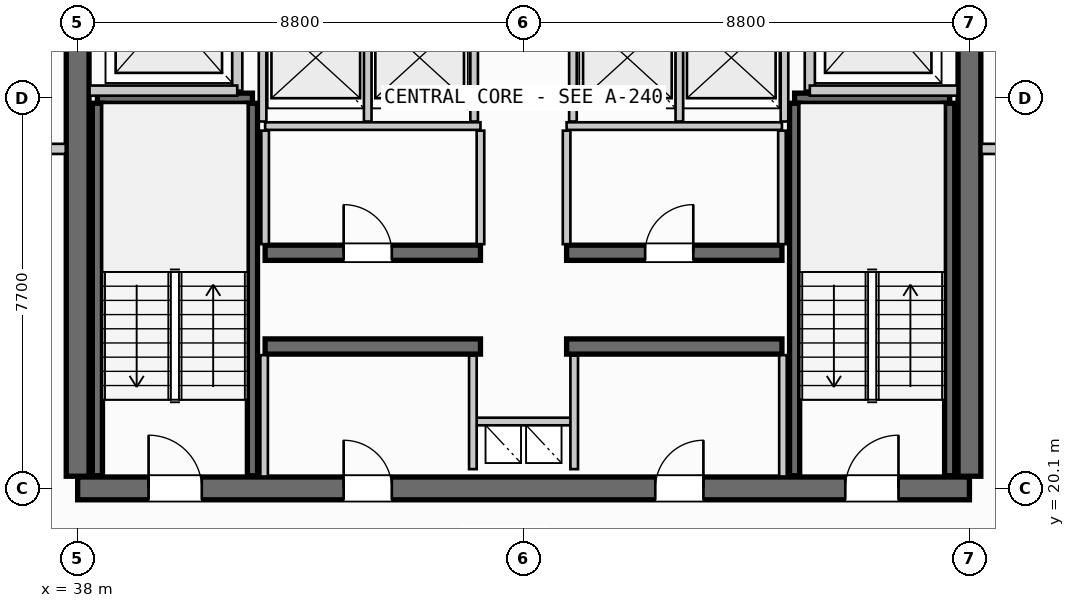
"""IFC4 building model, lengths in metres.
Left out: names, types, materials, properties, quantities, classifications, styles, units other than length and angle.
Written with IfcOpenShell. Run it as: python <this file> out.ifc"""

import sys

from ifc_helpers import new_model, si_unit, direction, frame, frame_2d, origin, place, context, subcontext, project, spatial, rectangle, extrude, source, transform, mapped, element, fill, save


model = new_model("IFC4")
c1 = context("Model", 3, precision=1e-05, world=origin(), true_north=direction((0.0, 1.0)))
c2 = subcontext(c1, "Body", "Model", "MODEL_VIEW")
j1 = project(units=[si_unit("LENGTHUNIT", "METRE"), si_unit("PLANEANGLEUNIT", "RADIAN")], contexts=[c1])
p1 = place(None, origin())
s1 = spatial("IfcSite", under=j1, at=p1, CompositionType="ELEMENT")
p2 = place(p1, origin())
s2 = spatial("IfcBuilding", under=s1, at=p2, CompositionType="ELEMENT")
p3 = place(p2, frame((0.0, 0.0, 287.05)))
s3 = spatial("IfcBuildingStorey", under=s2, at=p3, CompositionType="ELEMENT", Elevation=287.05)
p4 = place(p3, frame((38.0, 20.1, 0.0), z_axis=(0.0, 0.0, 1.0), x_axis=(1.0, 0.0, 0.0)))
e1 = element("IfcWall", 1, at=p4, inside=s3, PredefinedType="SHEAR", context=c2, shape_type="SweptSolid", body=[
    extrude(rectangle(XDim=17.6, YDim=0.45, at=frame_2d((8.8, 0.0))), origin(), (0.0, 0.0, 1.0), 3.21),
])
p5 = place(p4, frame((1.4, 0.0, 0.0)))
e2 = element("IfcOpeningElement", 2, at=p5, cuts=e1, PredefinedType="OPENING", context=c2, shape_type="SweptSolid", body=[
    extrude(rectangle(XDim=1.05, YDim=2.15, at=frame_2d((0.525, 1.075))), frame((0.0, 0.235, 0.0), z_axis=(0.0, -1.0, 0.0), x_axis=(1.0, 0.0, 0.0)), (0.0, 0.0, 1.0), 0.47),
])
p6 = place(p4, frame((15.15, 0.0, 0.0)))
e3 = element("IfcOpeningElement", 3, at=p6, cuts=e1, PredefinedType="OPENING", context=c2, shape_type="SweptSolid", body=[
    extrude(rectangle(XDim=1.05, YDim=2.15, at=frame_2d((0.525, 1.075))), frame((0.0, 0.235, 0.0), z_axis=(0.0, -1.0, 0.0), x_axis=(1.0, 0.0, 0.0)), (0.0, 0.0, 1.0), 0.47),
])
p7 = place(p4, frame((5.25, 0.0, 0.0)))
e4 = element("IfcOpeningElement", 4, at=p7, cuts=e1, PredefinedType="OPENING", context=c2, shape_type="SweptSolid", body=[
    extrude(rectangle(XDim=0.95, YDim=2.15, at=frame_2d((0.475, 1.075))), frame((0.0, 0.235, 0.0), z_axis=(0.0, -1.0, 0.0), x_axis=(1.0, 0.0, 0.0)), (0.0, 0.0, 1.0), 0.47),
])
p8 = place(p4, frame((11.4, 0.0, 0.0)))
e5 = element("IfcOpeningElement", 5, at=p8, cuts=e1, PredefinedType="OPENING", context=c2, shape_type="SweptSolid", body=[
    extrude(rectangle(XDim=0.95, YDim=2.15, at=frame_2d((0.475, 1.075))), frame((0.0, 0.235, 0.0), z_axis=(0.0, -1.0, 0.0), x_axis=(1.0, 0.0, 0.0)), (0.0, 0.0, 1.0), 0.47),
])
p9 = place(p3, frame((38.0, 35.26, 0.0), z_axis=(0.0, 0.0, 1.0), x_axis=(0.0, -1.0, 0.0)))
e6 = element("IfcWall", 6, at=p9, inside=s3, PredefinedType="SHEAR", context=c2, shape_type="SweptSolid", body=[
    extrude(rectangle(XDim=14.92, YDim=0.45, at=frame_2d((7.46, 0.0))), origin(), (0.0, 0.0, 1.0), 3.21),
])
p10 = place(p9, frame((5.21, 0.0, 0.0)))
e7 = element("IfcOpeningElement", 7, at=p10, cuts=e6, PredefinedType="OPENING", context=c2, shape_type="SweptSolid", body=[
    extrude(rectangle(XDim=1.1, YDim=2.2, at=frame_2d((0.55, 1.1))), frame((0.0, 0.235, 0.0), z_axis=(0.0, -1.0, 0.0), x_axis=(1.0, 0.0, 0.0)), (0.0, 0.0, 1.0), 0.47),
])
p11 = place(p3, frame((55.6, 20.34, 0.0), z_axis=(0.0, 0.0, 1.0), x_axis=(0.0, 1.0, 0.0)))
e8 = element("IfcWall", 8, at=p11, inside=s3, PredefinedType="SHEAR", context=c2, shape_type="SweptSolid", body=[
    extrude(rectangle(XDim=14.92, YDim=0.45, at=frame_2d((7.46, 0.0))), origin(), (0.0, 0.0, 1.0), 3.21),
])
p12 = place(p11, frame((12.71, 0.0, 0.0)))
e9 = element("IfcOpeningElement", 9, at=p12, cuts=e8, PredefinedType="OPENING", context=c2, shape_type="SweptSolid", body=[
    extrude(rectangle(XDim=1.05, YDim=2.15, at=frame_2d((0.525, 1.075))), frame((0.0, 0.235, 0.0), z_axis=(0.0, -1.0, 0.0), x_axis=(1.0, 0.0, 0.0)), (0.0, 0.0, 1.0), 0.47),
])
p13 = place(p11, frame((8.61, 0.0, 0.0)))
e10 = element("IfcOpeningElement", 10, at=p13, cuts=e8, PredefinedType="OPENING", context=c2, shape_type="SweptSolid", body=[
    extrude(rectangle(XDim=1.1, YDim=2.2, at=frame_2d((0.55, 1.1))), frame((0.0, 0.235, 0.0), z_axis=(0.0, -1.0, 0.0), x_axis=(1.0, 0.0, 0.0)), (0.0, 0.0, 1.0), 0.47),
])
for number, where, z_axis, x_axis in (
    (11, (41.7, 22.9, 0.0), (0.0, 0.0, 1.0), (1.0, 0.0, 0.0)),
    (12, (47.65, 22.9, 0.0), (0.0, 0.0, 1.0), (1.0, 0.0, 0.0)),
):
    element("IfcWall", number, at=place(p3, frame(where, z_axis=z_axis, x_axis=x_axis)), inside=s3, PredefinedType="SHEAR", context=c2, shape_type="SweptSolid", body=[
        extrude(rectangle(XDim=4.25, YDim=0.3, at=frame_2d((2.125, 0.0))), origin(), (0.0, 0.0, 1.0), 3.21),
    ])
p14 = place(p3, frame((41.7, 24.75, 0.0), z_axis=(0.0, 0.0, 1.0), x_axis=(1.0, 0.0, 0.0)))
e13 = element("IfcWall", 13, at=p14, inside=s3, PredefinedType="SHEAR", context=c2, shape_type="SweptSolid", body=[
    extrude(rectangle(XDim=4.25, YDim=0.3, at=frame_2d((2.125, 0.0))), origin(), (0.0, 0.0, 1.0), 3.21),
])
p15 = place(p14, frame((1.55, 0.0, 0.0)))
e14 = element("IfcOpeningElement", 14, at=p15, cuts=e13, PredefinedType="OPENING", context=c2, shape_type="SweptSolid", body=[
    extrude(rectangle(XDim=0.95, YDim=2.15, at=frame_2d((0.475, 1.075))), frame((0.0, 0.16, 0.0), z_axis=(0.0, -1.0, 0.0), x_axis=(1.0, 0.0, 0.0)), (0.0, 0.0, 1.0), 0.32),
])
p16 = place(p3, frame((47.65, 24.75, 0.0), z_axis=(0.0, 0.0, 1.0), x_axis=(1.0, 0.0, 0.0)))
e15 = element("IfcWall", 15, at=p16, inside=s3, PredefinedType="SHEAR", context=c2, shape_type="SweptSolid", body=[
    extrude(rectangle(XDim=4.25, YDim=0.3, at=frame_2d((2.125, 0.0))), origin(), (0.0, 0.0, 1.0), 3.21),
])
p17 = place(p16, frame((1.55, 0.0, 0.0)))
e16 = element("IfcOpeningElement", 16, at=p17, cuts=e15, PredefinedType="OPENING", context=c2, shape_type="SweptSolid", body=[
    extrude(rectangle(XDim=0.95, YDim=2.15, at=frame_2d((0.475, 1.075))), frame((0.0, 0.16, 0.0), z_axis=(0.0, -1.0, 0.0), x_axis=(1.0, 0.0, 0.0)), (0.0, 0.0, 1.0), 0.32),
])
p18 = place(p3, frame((38.39, 27.8, 0.0), z_axis=(0.0, 0.0, 1.0), x_axis=(1.0, 0.0, 0.0)))
e17 = element("IfcWall", 17, at=p18, inside=s3, PredefinedType="SHEAR", context=c2, shape_type="SweptSolid", body=[
    extrude(rectangle(XDim=3.06, YDim=0.2, at=frame_2d((1.53, 0.0))), origin(), (0.0, 0.0, 1.0), 3.21),
])
for number, where, z_axis, x_axis in (
    (18, (41.45, 27.7, 0.0), (0.0, 0.0, 1.0), (0.0, -1.0, 0.0)),
    (19, (38.39, 20.35, 0.0), (0.0, 0.0, 1.0), (0.0, 1.0, 0.0)),
):
    element("IfcWall", number, at=place(p3, frame(where, z_axis=z_axis, x_axis=x_axis)), inside=s3, PredefinedType="SHEAR", context=c2, shape_type="SweptSolid", body=[
        extrude(rectangle(XDim=7.35, YDim=0.2, at=frame_2d((3.675, 0.0))), origin(), (0.0, 0.0, 1.0), 3.21),
    ])
p19 = place(p3, frame((52.15, 27.8, 0.0), z_axis=(0.0, 0.0, 1.0), x_axis=(1.0, 0.0, 0.0)))
e20 = element("IfcWall", 20, at=p19, inside=s3, PredefinedType="SHEAR", context=c2, shape_type="SweptSolid", body=[
    extrude(rectangle(XDim=3.06, YDim=0.2, at=frame_2d((1.53, 0.0))), origin(), (0.0, 0.0, 1.0), 3.21),
])
for number, where, z_axis, x_axis in (
    (21, (55.21, 27.7, 0.0), (0.0, 0.0, 1.0), (0.0, -1.0, 0.0)),
    (22, (52.15, 20.35, 0.0), (0.0, 0.0, 1.0), (0.0, 1.0, 0.0)),
):
    element("IfcWall", number, at=place(p3, frame(where, z_axis=z_axis, x_axis=x_axis)), inside=s3, PredefinedType="SHEAR", context=c2, shape_type="SweptSolid", body=[
        extrude(rectangle(XDim=7.35, YDim=0.2, at=frame_2d((3.675, 0.0))), origin(), (0.0, 0.0, 1.0), 3.21),
    ])
p20 = place(p3, frame((45.8, 21.42, 0.0), z_axis=(0.0, 0.0, 1.0), x_axis=(1.0, 0.0, 0.0)))
e23 = element("IfcWall", 23, at=p20, inside=s3, PredefinedType="PARTITIONING", context=c2, shape_type="SweptSolid", body=[
    extrude(rectangle(XDim=2.0, YDim=0.15, at=frame_2d((1.0, 0.0))), origin(), (0.0, 0.0, 1.0), 2.315),
])
for number, where, z_axis, x_axis in (
    (24, (45.8, 20.48, 0.0), (0.0, 0.0, 1.0), (0.0, 1.0, 0.0)),
    (25, (47.8, 20.48, 0.0), (0.0, 0.0, 1.0), (0.0, 1.0, 0.0)),
):
    element("IfcWall", number, at=place(p3, frame(where, z_axis=z_axis, x_axis=x_axis)), inside=s3, PredefinedType="PARTITIONING", context=c2, shape_type="SweptSolid", body=[
        extrude(rectangle(XDim=2.24, YDim=0.15, at=frame_2d((1.12, 0.0))), origin(), (0.0, 0.0, 1.0), 2.315),
    ])
p21 = place(p3, frame((41.15, 27.95, 0.0), z_axis=(0.0, 0.0, 1.0), x_axis=(0.0, 1.0, 0.0)))
e26 = element("IfcWall", 26, at=p21, inside=s3, PredefinedType="PARTITIONING", context=c2, shape_type="SweptSolid", body=[
    extrude(rectangle(XDim=3.1, YDim=0.2, at=frame_2d((1.55, 0.0))), origin(), (0.0, 0.0, 1.0), 2.315),
])
p22 = place(p3, frame((38.235, 27.95, 0.0), z_axis=(0.0, 0.0, 1.0), x_axis=(1.0, 0.0, 0.0)))
e27 = element("IfcWall", 27, at=p22, inside=s3, PredefinedType="PARTITIONING", context=c2, shape_type="SweptSolid", body=[
    extrude(rectangle(XDim=2.915, YDim=0.2, at=frame_2d((1.458, 0.0))), origin(), (0.0, 0.0, 1.0), 2.315),
])
p23 = place(p3, frame((34.5, 26.8, 0.0), z_axis=(0.0, 0.0, 1.0), x_axis=(1.0, 0.0, 0.0)))
e28 = element("IfcWall", 28, at=p23, inside=s3, PredefinedType="PARTITIONING", context=c2, shape_type="SweptSolid", body=[
    extrude(rectangle(XDim=3.265, YDim=0.2, at=frame_2d((1.632, 0.0))), origin(), (0.0, 0.0, 1.0), 2.315),
])
p24 = place(p3, frame((52.45, 27.95, 0.0), z_axis=(0.0, 0.0, 1.0), x_axis=(0.0, 1.0, 0.0)))
e29 = element("IfcWall", 29, at=p24, inside=s3, PredefinedType="PARTITIONING", context=c2, shape_type="SweptSolid", body=[
    extrude(rectangle(XDim=3.1, YDim=0.2, at=frame_2d((1.55, 0.0))), origin(), (0.0, 0.0, 1.0), 2.315),
])
p25 = place(p3, frame((52.45, 27.95, 0.0), z_axis=(0.0, 0.0, 1.0), x_axis=(1.0, 0.0, 0.0)))
e30 = element("IfcWall", 30, at=p25, inside=s3, PredefinedType="PARTITIONING", context=c2, shape_type="SweptSolid", body=[
    extrude(rectangle(XDim=2.915, YDim=0.2, at=frame_2d((1.458, 0.0))), origin(), (0.0, 0.0, 1.0), 2.315),
])
p26 = place(p3, frame((55.835, 26.8, 0.0), z_axis=(0.0, 0.0, 1.0), x_axis=(1.0, 0.0, 0.0)))
e31 = element("IfcWall", 31, at=p26, inside=s3, PredefinedType="PARTITIONING", context=c2, shape_type="SweptSolid", body=[
    extrude(rectangle(XDim=3.265, YDim=0.2, at=frame_2d((1.633, 0.0))), origin(), (0.0, 0.0, 1.0), 2.315),
])
for number, where, z_axis, x_axis in (
    (32, (41.68, 20.335, 0.0), (0.0, 0.0, 1.0), (0.0, 1.0, 0.0)),
    (33, (51.92, 20.335, 0.0), (0.0, 0.0, 1.0), (0.0, 1.0, 0.0)),
):
    element("IfcWall", number, at=place(p3, frame(where, z_axis=z_axis, x_axis=x_axis)), inside=s3, PredefinedType="PARTITIONING", context=c2, shape_type="SweptSolid", body=[
        extrude(rectangle(XDim=2.395, YDim=0.15, at=frame_2d((1.198, 0.0))), origin(), (0.0, 0.0, 1.0), 2.315),
    ])
for number, where, z_axis, x_axis in (
    (34, (41.7, 27.25, 0.0), (0.0, 0.0, 1.0), (1.0, 0.0, 0.0)),
    (35, (47.65, 27.25, 0.0), (0.0, 0.0, 1.0), (1.0, 0.0, 0.0)),
):
    element("IfcWall", number, at=place(p3, frame(where, z_axis=z_axis, x_axis=x_axis)), inside=s3, PredefinedType="PARTITIONING", context=c2, shape_type="SweptSolid", body=[
        extrude(rectangle(XDim=4.25, YDim=0.15, at=frame_2d((2.125, 0.0))), origin(), (0.0, 0.0, 1.0), 2.315),
    ])
for number, where, z_axis, x_axis in (
    (36, (41.7, 24.92, 0.0), (0.0, 0.0, 1.0), (0.0, 1.0, 0.0)),
    (37, (45.95, 24.92, 0.0), (0.0, 0.0, 1.0), (0.0, 1.0, 0.0)),
    (38, (47.65, 24.92, 0.0), (0.0, 0.0, 1.0), (0.0, 1.0, 0.0)),
    (39, (51.9, 24.92, 0.0), (0.0, 0.0, 1.0), (0.0, 1.0, 0.0)),
):
    element("IfcWall", number, at=place(p3, frame(where, z_axis=z_axis, x_axis=x_axis)), inside=s3, PredefinedType="PARTITIONING", context=c2, shape_type="SweptSolid", body=[
        extrude(rectangle(XDim=2.24, YDim=0.15, at=frame_2d((1.12, 0.0))), origin(), (0.0, 0.0, 1.0), 2.315),
    ])
for number, where, z_axis, x_axis in (
    (40, (41.65, 27.34, 0.0), (0.0, 0.0, 1.0), (0.0, 1.0, 0.0)),
    (41, (43.725, 27.34, 0.0), (0.0, 0.0, 1.0), (0.0, 1.0, 0.0)),
    (42, (45.825, 27.34, 0.0), (0.0, 0.0, 1.0), (0.0, 1.0, 0.0)),
    (43, (47.775, 27.34, 0.0), (0.0, 0.0, 1.0), (0.0, 1.0, 0.0)),
    (44, (49.875, 27.34, 0.0), (0.0, 0.0, 1.0), (0.0, 1.0, 0.0)),
    (45, (51.95, 27.34, 0.0), (0.0, 0.0, 1.0), (0.0, 1.0, 0.0)),
):
    element("IfcWall", number, at=place(p3, frame(where, z_axis=z_axis, x_axis=x_axis)), inside=s3, PredefinedType="PARTITIONING", context=c2, shape_type="SweptSolid", body=[
        extrude(rectangle(XDim=2.34, YDim=0.15, at=frame_2d((1.17, 0.0))), origin(), (0.0, 0.0, 1.0), 2.315),
    ])
m1 = source(origin(), c2, "Body", "SweptSolid", [
    extrude(rectangle(XDim=1.05, YDim=2.15, at=frame_2d((0.525, 1.075))), frame((0.0, 0.025, 0.0), z_axis=(0.0, -1.0, 0.0), x_axis=(1.0, 0.0, 0.0)), (0.0, 0.0, 1.0), 0.05),
])
p27 = place(p5, origin())
e46 = element("IfcDoor", 46, at=p27, inside=s3, OperationType="SINGLE_SWING_LEFT", PredefinedType="DOOR", context=c2, shape_type="MappedRepresentation", body=[
    mapped(m1, transform((0.0, 0.0, 0.0), scale=1.0)),
])
fill(e2, e46)
p28 = place(p6, origin())
e47 = element("IfcDoor", 47, at=p28, inside=s3, OperationType="SINGLE_SWING_RIGHT", PredefinedType="DOOR", context=c2, shape_type="MappedRepresentation", body=[
    mapped(m1, transform((0.0, 0.0, 0.0), scale=1.0)),
])
fill(e3, e47)
m2 = source(origin(), c2, "Body", "SweptSolid", [
    extrude(rectangle(XDim=0.95, YDim=2.15, at=frame_2d((0.475, 1.075))), frame((0.0, 0.025, 0.0), z_axis=(0.0, -1.0, 0.0), x_axis=(1.0, 0.0, 0.0)), (0.0, 0.0, 1.0), 0.05),
])
p29 = place(p7, origin())
e48 = element("IfcDoor", 48, at=p29, inside=s3, OperationType="SINGLE_SWING_LEFT", PredefinedType="DOOR", context=c2, shape_type="MappedRepresentation", body=[
    mapped(m2, transform((0.0, 0.0, 0.0), scale=1.0)),
])
fill(e4, e48)
p30 = place(p8, origin())
e49 = element("IfcDoor", 49, at=p30, inside=s3, OperationType="SINGLE_SWING_RIGHT", PredefinedType="DOOR", context=c2, shape_type="MappedRepresentation", body=[
    mapped(m2, transform((0.0, 0.0, 0.0), scale=1.0)),
])
fill(e5, e49)
p31 = place(p15, origin())
e50 = element("IfcDoor", 50, at=p31, inside=s3, OperationType="SINGLE_SWING_LEFT", PredefinedType="DOOR", context=c2, shape_type="MappedRepresentation", body=[
    mapped(m2, transform((0.0, 0.0, 0.0), scale=1.0)),
])
fill(e14, e50)
p32 = place(p17, origin())
e51 = element("IfcDoor", 51, at=p32, inside=s3, OperationType="SINGLE_SWING_RIGHT", PredefinedType="DOOR", context=c2, shape_type="MappedRepresentation", body=[
    mapped(m2, transform((0.0, 0.0, 0.0), scale=1.0)),
])
fill(e16, e51)
save(model, sys.argv[1])
